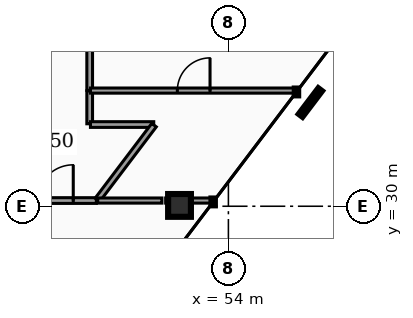
"""IFC4 building model, lengths in metres.
Left out: names, types, materials, properties, quantities, classifications, styles, units other than length and angle.
Written with IfcOpenShell. Run it as: python <this file> out.ifc"""

import sys

from ifc_helpers import new_model, si_unit, direction, frame, frame_2d, origin, origin_2d, place, context, subcontext, project, spatial, rectangle, hollow_rectangle, extrude, element, fill, save


model = new_model("IFC4")
c1 = context("Model", 3, precision=1e-05, world=origin(), true_north=direction((0.0, 1.0)))
c2 = subcontext(c1, "Body", "Model", "MODEL_VIEW")
j1 = project(units=[si_unit("LENGTHUNIT", "METRE"), si_unit("PLANEANGLEUNIT", "RADIAN")], contexts=[c1])
p1 = place(None, origin())
s1 = spatial("IfcSite", under=j1, at=p1, CompositionType="ELEMENT")
p2 = place(p1, origin())
s2 = spatial("IfcBuilding", under=s1, at=p2, CompositionType="ELEMENT")
p3 = place(p2, frame((0.0, 0.0, 225.76)))
s3 = spatial("IfcBuildingStorey", under=s2, at=p3, CompositionType="ELEMENT", Elevation=225.76)
p4 = place(p3, frame((52.714, 30.022, 0.0), z_axis=(-0.0832526404, 0.093840121659, 0.992100312183), x_axis=(-0.748045467566, -0.66364748056, 0.0)))
e1 = element("IfcColumn", 1, at=p4, inside=s3, PredefinedType="COLUMN", context=c2, shape_type="SweptSolid", body=[
    extrude(hollow_rectangle(XDim=0.6, YDim=0.6, WallThickness=0.03, at=origin_2d()), origin(), (0.0, 0.0, 1.0), 3.205),
])
p5 = place(p3, frame((48.37, 30.15, 0.0), z_axis=(0.0, 0.0, 1.0), x_axis=(1.0, 0.0, 0.0)))
e2 = element("IfcWall", 2, at=p5, inside=s3, PredefinedType="PARTITIONING", context=c2, shape_type="SweptSolid", body=[
    extrude(rectangle(XDim=2.155, YDim=0.15, at=frame_2d((1.078, 0.0))), origin(), (0.0, 0.0, 1.0), 2.235),
])
p6 = place(p5, frame((0.608, 0.0, 0.0)))
e3 = element("IfcOpeningElement", 3, at=p6, cuts=e2, PredefinedType="OPENING", context=c2, shape_type="SweptSolid", body=[
    extrude(rectangle(XDim=0.94, YDim=2.05, at=frame_2d((0.47, 1.025))), frame((0.0, 0.085, 0.0), z_axis=(0.0, -1.0, 0.0), x_axis=(1.0, 0.0, 0.0)), (0.0, 0.0, 1.0), 0.17),
])
p7 = place(p3, frame((50.35, 33.049, 0.0), z_axis=(0.0, 0.0, 1.0), x_axis=(0.0, 1.0, 0.0)))
e4 = element("IfcWall", 4, at=p7, inside=s3, PredefinedType="PARTITIONING", context=c2, shape_type="SweptSolid", body=[
    extrude(rectangle(XDim=10.501, YDim=0.15, at=frame_2d((5.251, 0.0))), origin(), (0.0, 0.0, 1.0), 2.235),
])
p8 = place(p7, frame((4.781, 0.0, 0.0)))
e5 = element("IfcOpeningElement", 5, at=p8, cuts=e4, PredefinedType="OPENING", context=c2, shape_type="SweptSolid", body=[
    extrude(rectangle(XDim=0.94, YDim=2.05, at=frame_2d((0.47, 1.025))), frame((0.0, 0.085, 0.0), z_axis=(0.0, -1.0, 0.0), x_axis=(1.0, 0.0, 0.0)), (0.0, 0.0, 1.0), 0.17),
])
p9 = place(p3, frame((50.35, 32.17, 0.0), z_axis=(0.0, 0.0, 1.0), x_axis=(0.0, 1.0, 0.0)))
e6 = element("IfcWall", 6, at=p9, inside=s3, PredefinedType="PARTITIONING", context=c2, shape_type="SweptSolid", body=[
    extrude(rectangle(XDim=0.869, YDim=0.15, at=frame_2d((0.434, 0.0))), origin(), (0.0, 0.0, 1.0), 2.235),
])
p10 = place(p3, frame((50.37, 32.15, 0.0), z_axis=(0.0, 0.0, 1.0), x_axis=(1.0, 0.0, 0.0)))
e7 = element("IfcWall", 7, at=p10, inside=s3, PredefinedType="PARTITIONING", context=c2, shape_type="SweptSolid", body=[
    extrude(rectangle(XDim=1.665, YDim=0.15, at=frame_2d((0.833, 0.0))), origin(), (0.0, 0.0, 1.0), 2.235),
])
p11 = place(p3, frame((50.552, 30.166, 0.0), z_axis=(0.0, 0.0, 1.0), x_axis=(0.603869110647, 0.797083494502, 0.0)))
e8 = element("IfcWall", 8, at=p11, inside=s3, PredefinedType="PARTITIONING", context=c2, shape_type="SweptSolid", body=[
    extrude(rectangle(XDim=2.469, YDim=0.15, at=frame_2d((1.234, 0.0))), origin(), (0.0, 0.0, 1.0), 2.235),
])
p12 = place(p3, frame((50.56, 30.15, 0.0), z_axis=(0.0, 0.0, 1.0), x_axis=(1.0, 0.0, 0.0)))
e9 = element("IfcWall", 9, at=p12, inside=s3, PredefinedType="PARTITIONING", context=c2, shape_type="SweptSolid", body=[
    extrude(rectangle(XDim=1.691, YDim=0.135, at=frame_2d((0.845, 0.0))), origin(), (0.0, 0.0, 1.0), 2.235),
])
p13 = place(p3, frame((52.349, 30.15, 0.0), z_axis=(0.0, 0.0, 1.0), x_axis=(1.0, 0.0, 0.0)))
e10 = element("IfcWall", 10, at=p13, inside=s3, PredefinedType="PARTITIONING", context=c2, shape_type="SweptSolid", body=[
    extrude(rectangle(XDim=1.262, YDim=0.135, at=frame_2d((0.631, 0.0))), origin(), (0.0, 0.0, 1.0), 2.235),
])
p14 = place(p3, frame((50.37, 33.043, 0.0), z_axis=(0.0, 0.0, 1.0), x_axis=(1.0, 0.0, 0.0)))
e11 = element("IfcWall", 11, at=p14, inside=s3, PredefinedType="PARTITIONING", context=c2, shape_type="SweptSolid", body=[
    extrude(rectangle(XDim=5.433, YDim=0.135, at=frame_2d((2.717, 0.0))), origin(), (0.0, 0.0, 1.0), 2.235),
])
p15 = place(p14, frame((2.287, 0.0, 0.0)))
e12 = element("IfcOpeningElement", 12, at=p15, cuts=e11, PredefinedType="OPENING", context=c2, shape_type="SweptSolid", body=[
    extrude(rectangle(XDim=0.86, YDim=2.05, at=frame_2d((0.43, 1.025))), frame((0.0, 0.077, 0.0), z_axis=(0.0, -1.0, 0.0), x_axis=(1.0, 0.0, 0.0)), (0.0, 0.0, 1.0), 0.155),
])
p16 = place(p6, origin())
e13 = element("IfcDoor", 13, at=p16, inside=s3, OperationType="SINGLE_SWING_RIGHT", PredefinedType="DOOR", context=c2, shape_type="SweptSolid", body=[
    extrude(rectangle(XDim=0.94, YDim=2.05, at=frame_2d((0.47, 1.025))), frame((0.0, 0.025, 0.0), z_axis=(0.0, -1.0, 0.0), x_axis=(1.0, 0.0, 0.0)), (0.0, 0.0, 1.0), 0.05),
])
fill(e3, e13)
p17 = place(p15, origin())
e14 = element("IfcDoor", 14, at=p17, inside=s3, OperationType="SINGLE_SWING_RIGHT", PredefinedType="DOOR", context=c2, shape_type="SweptSolid", body=[
    extrude(rectangle(XDim=0.86, YDim=2.05, at=frame_2d((0.43, 1.025))), frame((0.0, 0.025, 0.0), z_axis=(0.0, -1.0, 0.0), x_axis=(1.0, 0.0, 0.0)), (0.0, 0.0, 1.0), 0.05),
])
fill(e12, e14)
save(model, sys.argv[1])
